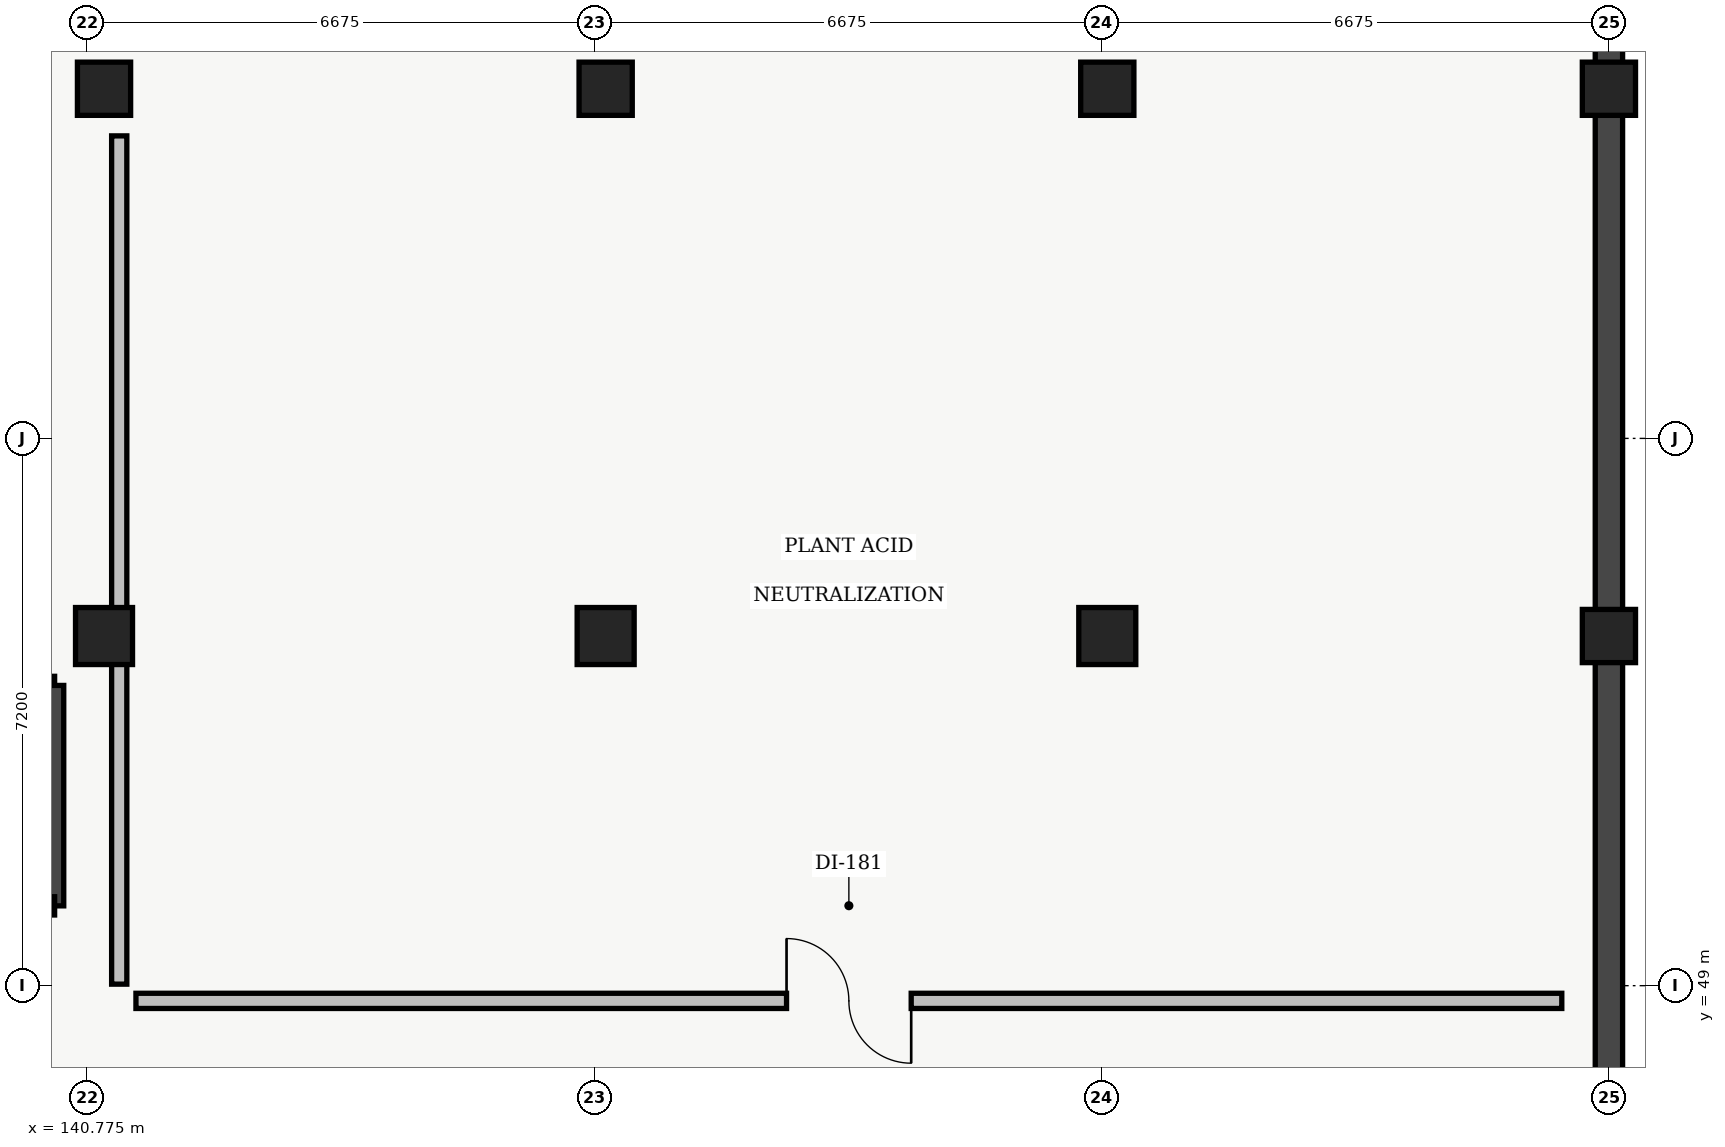
"""IFC4 building model, lengths in metres.
Left out: names, types, materials, properties, quantities, classifications, styles, units other than length and angle.
Written with IfcOpenShell. Run it as: python <this file> out.ifc"""

import sys

from ifc_helpers import new_model, si_unit, direction, frame, frame_2d, origin, origin_2d, place, context, subcontext, project, spatial, rectangle, extrude, element, fill, save


model = new_model("IFC4")
c1 = context("Model", 3, precision=1e-05, world=origin(), true_north=direction((0.0, 1.0)))
c2 = subcontext(c1, "Body", "Model", "MODEL_VIEW")
j1 = project(units=[si_unit("LENGTHUNIT", "METRE"), si_unit("PLANEANGLEUNIT", "RADIAN")], contexts=[c1])
p1 = place(None, origin())
s1 = spatial("IfcSite", under=j1, at=p1, CompositionType="ELEMENT")
p2 = place(p1, origin())
s2 = spatial("IfcBuilding", under=s1, at=p2, CompositionType="ELEMENT")
p3 = place(p2, frame((0.0, 0.0, -4.8)))
s3 = spatial("IfcBuildingStorey", under=s2, at=p3, CompositionType="ELEMENT", Elevation=-4.8)
p4 = place(p3, frame((141.0, 53.6, 0.0), z_axis=(0.0, 0.0, 1.0), x_axis=(1.0, 0.0, 0.0)))
e1 = element("IfcColumn", 1, at=p4, inside=s3, PredefinedType="COLUMN", context=c2, shape_type="SweptSolid", body=[
    extrude(rectangle(XDim=0.75, YDim=0.75, at=origin_2d()), origin(), (0.0, 0.0, 1.0), 4.59),
])
p5 = place(p3, frame((141.0, 60.8, 0.0), z_axis=(0.0, 0.0, 1.0), x_axis=(1.0, 0.0, 0.0)))
e2 = element("IfcColumn", 2, at=p5, inside=s3, PredefinedType="COLUMN", context=c2, shape_type="SweptSolid", body=[
    extrude(rectangle(XDim=0.7, YDim=0.7, at=origin_2d()), origin(), (0.0, 0.0, 1.0), 4.59),
])
p6 = place(p3, frame((147.6, 53.6, 0.0), z_axis=(0.0, 0.0, 1.0), x_axis=(1.0, 0.0, 0.0)))
e3 = element("IfcColumn", 3, at=p6, inside=s3, PredefinedType="COLUMN", context=c2, shape_type="SweptSolid", body=[
    extrude(rectangle(XDim=0.75, YDim=0.75, at=origin_2d()), origin(), (0.0, 0.0, 1.0), 4.59),
])
p7 = place(p3, frame((147.6, 60.8, 0.0), z_axis=(0.0, 0.0, 1.0), x_axis=(1.0, 0.0, 0.0)))
e4 = element("IfcColumn", 4, at=p7, inside=s3, PredefinedType="COLUMN", context=c2, shape_type="SweptSolid", body=[
    extrude(rectangle(XDim=0.7, YDim=0.7, at=origin_2d()), origin(), (0.0, 0.0, 1.0), 4.59),
])
p8 = place(p3, frame((154.2, 53.6, 0.0), z_axis=(0.0, 0.0, 1.0), x_axis=(1.0, 0.0, 0.0)))
e5 = element("IfcColumn", 5, at=p8, inside=s3, PredefinedType="COLUMN", context=c2, shape_type="SweptSolid", body=[
    extrude(rectangle(XDim=0.75, YDim=0.75, at=origin_2d()), origin(), (0.0, 0.0, 1.0), 4.59),
])
for number, where, z_axis, x_axis in (
    (6, (154.2, 60.8, 0.0), (0.0, 0.0, 1.0), (1.0, 0.0, 0.0)),
    (7, (160.8, 53.6, 0.0), (0.0, 0.0, 1.0), (1.0, 0.0, 0.0)),
    (8, (160.8, 60.8, 0.0), (0.0, 0.0, 1.0), (1.0, 0.0, 0.0)),
):
    element("IfcColumn", number, at=place(p3, frame(where, z_axis=z_axis, x_axis=x_axis)), inside=s3, PredefinedType="COLUMN", context=c2, shape_type="SweptSolid", body=[
        extrude(rectangle(XDim=0.7, YDim=0.7, at=origin_2d()), origin(), (0.0, 0.0, 1.0), 4.59),
    ])
p9 = place(p3, frame((160.8, 61.6, 0.0), z_axis=(0.0, 0.0, 1.0), x_axis=(0.0, -1.0, 0.0)))
e9 = element("IfcWall", 9, at=p9, inside=s3, PredefinedType="USERDEFINED", context=c2, shape_type="SweptSolid", body=[
    extrude(rectangle(XDim=61.4, YDim=0.36, at=frame_2d((30.7, 0.0))), origin(), (0.0, 0.0, 1.0), 4.58),
])
p10 = place(p3, frame((138.05, 52.95, 0.0), z_axis=(0.0, 0.0, 1.0), x_axis=(1.0, 0.0, 0.0)))
e10 = element("IfcWall", 10, at=p10, inside=s3, PredefinedType="SHEAR", context=c2, shape_type="SweptSolid", body=[
    extrude(rectangle(XDim=2.3, YDim=0.24, at=frame_2d((1.15, 0.0))), origin(), (0.0, 0.0, 1.0), 4.58),
])
p11 = place(p3, frame((140.35, 52.95, 0.0), z_axis=(0.0, 0.0, 1.0), x_axis=(0.0, -1.0, 0.0)))
e11 = element("IfcWall", 11, at=p11, inside=s3, PredefinedType="SHEAR", context=c2, shape_type="SweptSolid", body=[
    extrude(rectangle(XDim=2.9, YDim=0.24, at=frame_2d((1.45, 0.0))), origin(), (0.0, 0.0, 1.0), 4.58),
])
p12 = place(p3, frame((140.35, 50.05, 0.0), z_axis=(0.0, 0.0, 1.0), x_axis=(-1.0, 0.0, 0.0)))
e12 = element("IfcWall", 12, at=p12, inside=s3, PredefinedType="SHEAR", context=c2, shape_type="SweptSolid", body=[
    extrude(rectangle(XDim=2.3, YDim=0.24, at=frame_2d((1.15, 0.0))), origin(), (0.0, 0.0, 1.0), 4.58),
])
p13 = place(p12, frame((0.425, 0.0, 0.0)))
e13 = element("IfcOpeningElement", 13, at=p13, cuts=e12, PredefinedType="OPENING", context=c2, shape_type="SweptSolid", body=[
    extrude(rectangle(XDim=1.45, YDim=2.3, at=frame_2d((0.725, 1.15))), frame((0.0, 0.12, 0.0), z_axis=(0.0, -1.0, 0.0), x_axis=(1.0, 0.0, 0.0)), (0.0, 0.0, 1.0), 0.24),
])
p14 = place(p3, frame((141.42, 48.8, 0.0), z_axis=(0.0, 0.0, 1.0), x_axis=(1.0, 0.0, 0.0)))
e14 = element("IfcWall", 14, at=p14, inside=s3, PredefinedType="SOLIDWALL", context=c2, shape_type="SweptSolid", body=[
    extrude(rectangle(XDim=18.76, YDim=0.2, at=frame_2d((9.38, 0.0))), origin(), (0.0, 0.0, 1.0), 4.125),
])
p15 = place(p14, frame((8.56, 0.0, 0.0)))
e15 = element("IfcOpeningElement", 15, at=p15, cuts=e14, PredefinedType="OPENING", context=c2, shape_type="SweptSolid", body=[
    extrude(rectangle(XDim=1.64, YDim=2.2, at=frame_2d((0.82, 1.1))), frame((0.0, 0.1, 0.0), z_axis=(0.0, -1.0, 0.0), x_axis=(1.0, 0.0, 0.0)), (0.0, 0.0, 1.0), 0.2),
])
p16 = place(p3, frame((141.2, 60.18, 0.0), z_axis=(0.0, 0.0, 1.0), x_axis=(0.0, -1.0, 0.0)))
e16 = element("IfcWall", 16, at=p16, inside=s3, PredefinedType="SOLIDWALL", context=c2, shape_type="SweptSolid", body=[
    extrude(rectangle(XDim=11.16, YDim=0.2, at=frame_2d((5.58, 0.0))), origin(), (0.0, 0.0, 1.0), 3.925),
])
p17 = place(p15, origin())
e17 = element("IfcDoor", 17, at=p17, inside=s3, OperationType="DOUBLE_DOOR_SINGLE_SWING", PredefinedType="DOOR", context=c2, shape_type="SweptSolid", body=[
    extrude(rectangle(XDim=1.64, YDim=2.2, at=frame_2d((0.82, 1.1))), frame((0.0, 0.025, 0.0), z_axis=(0.0, -1.0, 0.0), x_axis=(1.0, 0.0, 0.0)), (0.0, 0.0, 1.0), 0.05),
])
fill(e15, e17)
save(model, sys.argv[1])
